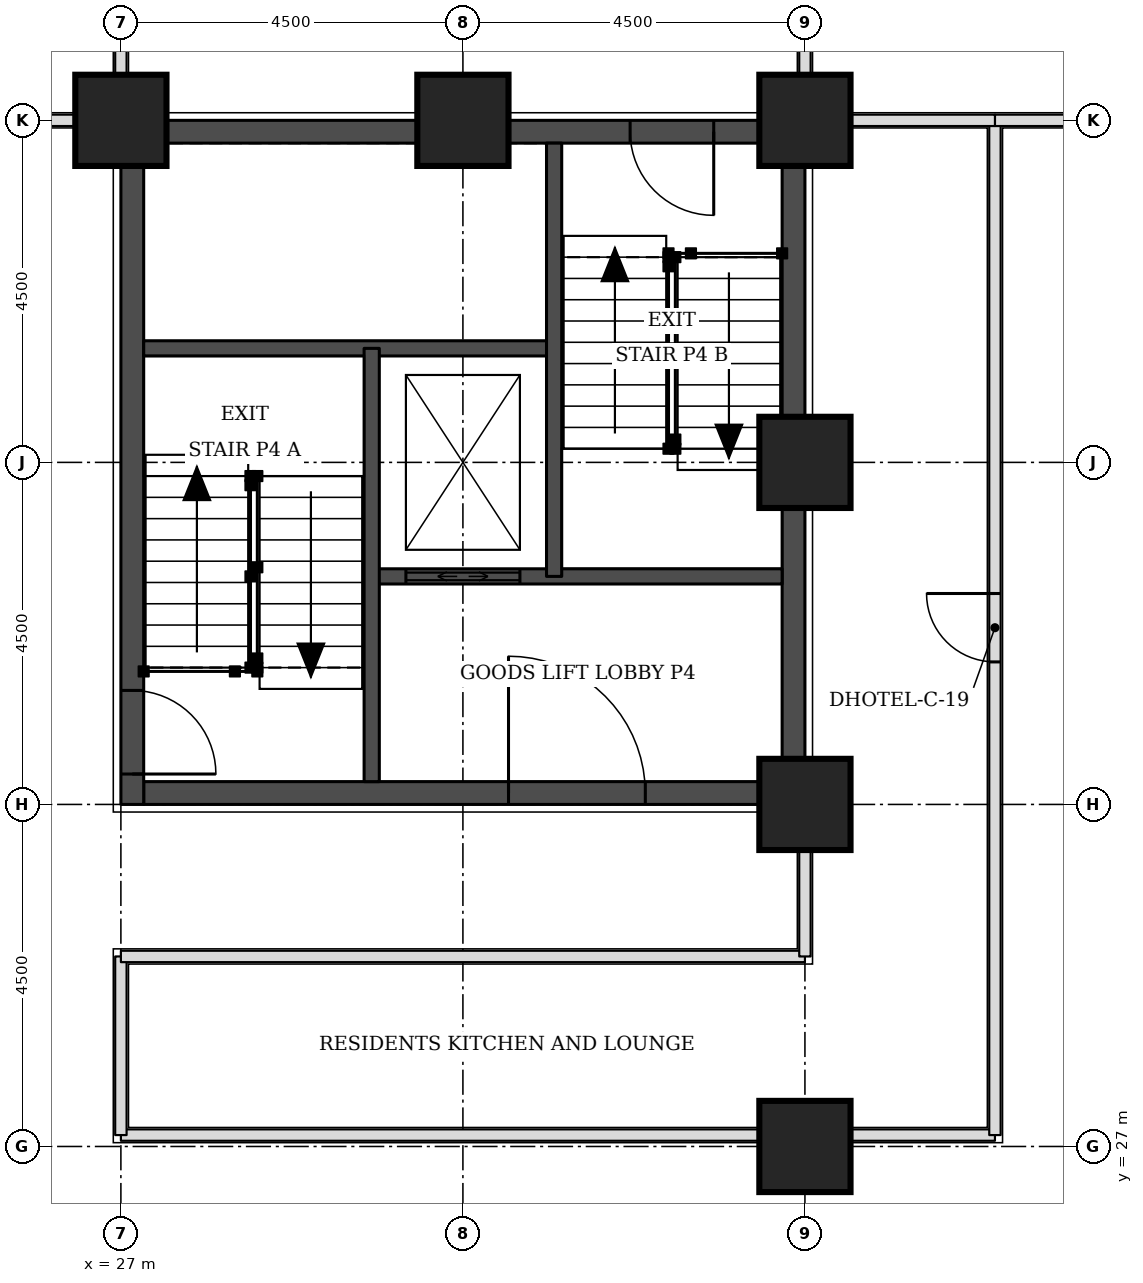
"""IFC4 building model, lengths in metres.
Left out: names, types, materials, properties, quantities, classifications, styles, units other than length and angle.
Written with IfcOpenShell. Run it as: python <this file> out.ifc"""

import sys

from ifc_helpers import new_model, si_unit, direction, frame, frame_2d, origin, origin_2d, place, context, subcontext, project, spatial, rectangle, extrude, element, fill, save


model = new_model("IFC4")
c1 = context("Model", 3, precision=1e-05, world=origin(), true_north=direction((0.0, 1.0)))
c2 = subcontext(c1, "Body", "Model", "MODEL_VIEW")
j1 = project(units=[si_unit("LENGTHUNIT", "METRE"), si_unit("PLANEANGLEUNIT", "RADIAN")], contexts=[c1])
p1 = place(None, origin())
s1 = spatial("IfcSite", under=j1, at=p1, CompositionType="ELEMENT")
p2 = place(p1, origin())
s2 = spatial("IfcBuilding", under=s1, at=p2, CompositionType="ELEMENT")
p3 = place(p2, frame((0.0, 0.0, 56.1)))
s3 = spatial("IfcBuildingStorey", under=s2, at=p3, CompositionType="ELEMENT", Elevation=56.1)
for number, where, z_axis, x_axis in (
    (1, (36.0, 27.0, 0.0), (0.0, 0.0, 1.0), (1.0, 0.0, 0.0)),
    (2, (36.0, 31.5, 0.0), (0.0, 0.0, 1.0), (1.0, 0.0, 0.0)),
    (3, (36.0, 36.0, 0.0), (0.0, 0.0, 1.0), (1.0, 0.0, 0.0)),
    (4, (27.0, 40.5, 0.0), (0.0, 0.0, 1.0), (1.0, 0.0, 0.0)),
    (5, (31.5, 40.5, 0.0), (0.0, 0.0, 1.0), (1.0, 0.0, 0.0)),
    (6, (36.0, 40.5, 0.0), (0.0, 0.0, 1.0), (1.0, 0.0, 0.0)),
):
    element("IfcColumn", number, at=place(p3, frame(where, z_axis=z_axis, x_axis=x_axis)), inside=s3, PredefinedType="COLUMN", context=c2, shape_type="SweptSolid", body=[
        extrude(rectangle(XDim=1.2, YDim=1.2, at=origin_2d()), origin(), (0.0, 0.0, 1.0), 3.3),
    ])
p4 = place(p3, frame((27.3, 31.65, 0.0), z_axis=(0.0, 0.0, 1.0), x_axis=(1.0, 0.0, 0.0)))
e7 = element("IfcWall", 7, at=p4, inside=s3, PredefinedType="SHEAR", context=c2, shape_type="SweptSolid", body=[
    extrude(rectangle(XDim=8.4, YDim=0.3, at=frame_2d((4.2, 0.0))), origin(), (0.0, 0.0, 1.0), 3.3),
])
p5 = place(p4, frame((4.8, 0.0, 0.0)))
e8 = element("IfcOpeningElement", 8, at=p5, cuts=e7, PredefinedType="OPENING", context=c2, shape_type="SweptSolid", body=[
    extrude(rectangle(XDim=1.8, YDim=2.1, at=frame_2d((0.9, 1.05))), frame((0.0, 0.16, 0.0), z_axis=(0.0, -1.0, 0.0), x_axis=(1.0, 0.0, 0.0)), (0.0, 0.0, 1.0), 0.32),
])
p6 = place(p3, frame((27.3, 40.35, 0.0), z_axis=(0.0, 0.0, 1.0), x_axis=(1.0, 0.0, 0.0)))
e9 = element("IfcWall", 9, at=p6, inside=s3, PredefinedType="SHEAR", context=c2, shape_type="SweptSolid", body=[
    extrude(rectangle(XDim=8.4, YDim=0.3, at=frame_2d((4.2, 0.0))), origin(), (0.0, 0.0, 1.0), 3.3),
])
p7 = place(p6, frame((6.4, 0.0, 0.0)))
e10 = element("IfcOpeningElement", 10, at=p7, cuts=e9, PredefinedType="OPENING", context=c2, shape_type="SweptSolid", body=[
    extrude(rectangle(XDim=1.1, YDim=2.1, at=frame_2d((0.55, 1.05))), frame((0.0, 0.16, 0.0), z_axis=(0.0, -1.0, 0.0), x_axis=(1.0, 0.0, 0.0)), (0.0, 0.0, 1.0), 0.32),
])
p8 = place(p3, frame((27.15, 31.5, 0.0), z_axis=(0.0, 0.0, 1.0), x_axis=(0.0, 1.0, 0.0)))
e11 = element("IfcWall", 11, at=p8, inside=s3, PredefinedType="SHEAR", context=c2, shape_type="SweptSolid", body=[
    extrude(rectangle(XDim=9.0, YDim=0.3, at=frame_2d((4.5, 0.0))), origin(), (0.0, 0.0, 1.0), 3.3),
])
p9 = place(p8, frame((0.4, 0.0, 0.0)))
e12 = element("IfcOpeningElement", 12, at=p9, cuts=e11, PredefinedType="OPENING", context=c2, shape_type="SweptSolid", body=[
    extrude(rectangle(XDim=1.1, YDim=2.1, at=frame_2d((0.55, 1.05))), frame((0.0, 0.16, 0.0), z_axis=(0.0, -1.0, 0.0), x_axis=(1.0, 0.0, 0.0)), (0.0, 0.0, 1.0), 0.32),
])
p10 = place(p3, frame((35.85, 31.5, 0.0), z_axis=(0.0, 0.0, 1.0), x_axis=(0.0, 1.0, 0.0)))
e13 = element("IfcWall", 13, at=p10, inside=s3, PredefinedType="SHEAR", context=c2, shape_type="SweptSolid", body=[
    extrude(rectangle(XDim=9.0, YDim=0.3, at=frame_2d((4.5, 0.0))), origin(), (0.0, 0.0, 1.0), 3.3),
])
p11 = place(p3, frame((27.0, 27.15, 0.0), z_axis=(0.0, 0.0, 1.0), x_axis=(1.0, 0.0, 0.0)))
e14 = element("IfcWall", 14, at=p11, inside=s3, PredefinedType="PARTITIONING", context=c2, shape_type="SweptSolid", body=[
    extrude(rectangle(XDim=11.5, YDim=0.15, at=frame_2d((5.75, 0.0))), origin(), (0.0, 0.0, 1.0), 3.08),
])
p12 = place(p3, frame((27.0, 27.15, 0.0), z_axis=(0.0, 0.0, 1.0), x_axis=(0.0, 1.0, 0.0)))
e15 = element("IfcWall", 15, at=p12, inside=s3, PredefinedType="PARTITIONING", context=c2, shape_type="SweptSolid", body=[
    extrude(rectangle(XDim=2.35, YDim=0.15, at=frame_2d((1.175, 0.0))), origin(), (0.0, 0.0, 1.0), 3.08),
])
p13 = place(p3, frame((38.5, 27.15, 0.0), z_axis=(0.0, 0.0, 1.0), x_axis=(0.0, 1.0, 0.0)))
e16 = element("IfcWall", 16, at=p13, inside=s3, PredefinedType="PARTITIONING", context=c2, shape_type="SweptSolid", body=[
    extrude(rectangle(XDim=13.35, YDim=0.15, at=frame_2d((6.675, 0.0))), origin(), (0.0, 0.0, 1.0), 3.08),
])
p14 = place(p13, frame((6.225, 0.0, 0.0)))
e17 = element("IfcOpeningElement", 17, at=p14, cuts=e16, PredefinedType="OPENING", context=c2, shape_type="SweptSolid", body=[
    extrude(rectangle(XDim=0.9, YDim=2.1, at=frame_2d((0.45, 1.05))), frame((0.0, 0.085, 0.0), z_axis=(0.0, -1.0, 0.0), x_axis=(1.0, 0.0, 0.0)), (0.0, 0.0, 1.0), 0.17),
])
p15 = place(p3, frame((27.0, 29.5, 0.0), z_axis=(0.0, 0.0, 1.0), x_axis=(1.0, 0.0, 0.0)))
e18 = element("IfcWall", 18, at=p15, inside=s3, PredefinedType="PARTITIONING", context=c2, shape_type="SweptSolid", body=[
    extrude(rectangle(XDim=9.0, YDim=0.15, at=frame_2d((4.5, 0.0))), origin(), (0.0, 0.0, 1.0), 3.08),
])
p16 = place(p3, frame((36.0, 29.5, 0.0), z_axis=(0.0, 0.0, 1.0), x_axis=(0.0, 1.0, 0.0)))
e19 = element("IfcWall", 19, at=p16, inside=s3, PredefinedType="PARTITIONING", context=c2, shape_type="SweptSolid", body=[
    extrude(rectangle(XDim=1.95, YDim=0.15, at=frame_2d((0.975, 0.0))), origin(), (0.0, 0.0, 1.0), 2.33),
])
p17 = place(p3, frame((24.6, 40.5, 0.0), z_axis=(0.0, 0.0, 1.0), x_axis=(1.0, 0.0, 0.0)))
e20 = element("IfcWall", 20, at=p17, inside=s3, PredefinedType="PARTITIONING", context=c2, shape_type="SweptSolid", body=[
    extrude(rectangle(XDim=2.35, YDim=0.15, at=frame_2d((1.175, 0.0))), origin(), (0.0, 0.0, 1.0), 2.33),
])
p18 = place(p3, frame((38.5, 40.5, 0.0), z_axis=(0.0, 0.0, 1.0), x_axis=(1.0, 0.0, 0.0)))
e21 = element("IfcWall", 21, at=p18, inside=s3, PredefinedType="PARTITIONING", context=c2, shape_type="SweptSolid", body=[
    extrude(rectangle(XDim=1.95, YDim=0.15, at=frame_2d((0.975, 0.0))), origin(), (0.0, 0.0, 1.0), 2.33),
])
p19 = place(p3, frame((27.0, 40.55, 0.0), z_axis=(0.0, 0.0, 1.0), x_axis=(0.0, 1.0, 0.0)))
e22 = element("IfcWall", 22, at=p19, inside=s3, PredefinedType="PARTITIONING", context=c2, shape_type="SweptSolid", body=[
    extrude(rectangle(XDim=2.45, YDim=0.15, at=frame_2d((1.225, 0.0))), origin(), (0.0, 0.0, 1.0), 3.08),
])
p20 = place(p3, frame((36.0, 40.55, 0.0), z_axis=(0.0, 0.0, 1.0), x_axis=(0.0, 1.0, 0.0)))
e23 = element("IfcWall", 23, at=p20, inside=s3, PredefinedType="PARTITIONING", context=c2, shape_type="SweptSolid", body=[
    extrude(rectangle(XDim=4.4, YDim=0.15, at=frame_2d((2.2, 0.0))), origin(), (0.0, 0.0, 1.0), 2.33),
])
p21 = place(p3, frame((36.05, 40.5, 0.0), z_axis=(0.0, 0.0, 1.0), x_axis=(1.0, 0.0, 0.0)))
e24 = element("IfcWall", 24, at=p21, inside=s3, PredefinedType="PARTITIONING", context=c2, shape_type="SweptSolid", body=[
    extrude(rectangle(XDim=2.45, YDim=0.15, at=frame_2d((1.225, 0.0))), origin(), (0.0, 0.0, 1.0), 2.33),
])
p22 = place(p3, frame((30.3, 34.5, 0.0), z_axis=(0.0, 0.0, 1.0), x_axis=(1.0, 0.0, 0.0)))
e25 = element("IfcWall", 25, at=p22, inside=s3, PredefinedType="SOLIDWALL", context=c2, shape_type="SweptSolid", body=[
    extrude(rectangle(XDim=5.4, YDim=0.2, at=frame_2d((2.7, 0.0))), origin(), (0.0, 0.0, 1.0), 3.08),
])
p23 = place(p22, frame((0.45, 0.0, 0.0)))
e26 = element("IfcOpeningElement", 26, at=p23, cuts=e25, PredefinedType="OPENING", context=c2, shape_type="SweptSolid", body=[
    extrude(rectangle(XDim=1.5, YDim=2.1, at=frame_2d((0.75, 1.05))), frame((0.0, 0.11, 0.0), z_axis=(0.0, -1.0, 0.0), x_axis=(1.0, 0.0, 0.0)), (0.0, 0.0, 1.0), 0.22),
])
p24 = place(p3, frame((27.3, 37.5, 0.0), z_axis=(0.0, 0.0, 1.0), x_axis=(1.0, 0.0, 0.0)))
e27 = element("IfcWall", 27, at=p24, inside=s3, PredefinedType="SOLIDWALL", context=c2, shape_type="SweptSolid", body=[
    extrude(rectangle(XDim=5.4, YDim=0.2, at=frame_2d((2.7, 0.0))), origin(), (0.0, 0.0, 1.0), 3.08),
])
for number, where, z_axis, x_axis in (
    (28, (30.3, 31.8, 0.0), (0.0, 0.0, 1.0), (0.0, 1.0, 0.0)),
    (29, (32.7, 34.5, 0.0), (0.0, 0.0, 1.0), (0.0, 1.0, 0.0)),
):
    element("IfcWall", number, at=place(p3, frame(where, z_axis=z_axis, x_axis=x_axis)), inside=s3, PredefinedType="SOLIDWALL", context=c2, shape_type="SweptSolid", body=[
        extrude(rectangle(XDim=5.7, YDim=0.2, at=frame_2d((2.85, 0.0))), origin(), (0.0, 0.0, 1.0), 3.08),
    ])
p25 = place(p14, origin())
e30 = element("IfcDoor", 30, at=p25, inside=s3, OperationType="SINGLE_SWING_RIGHT", PredefinedType="DOOR", context=c2, shape_type="SweptSolid", body=[
    extrude(rectangle(XDim=0.9, YDim=2.1, at=frame_2d((0.45, 1.05))), frame((0.0, 0.025, 0.0), z_axis=(0.0, -1.0, 0.0), x_axis=(1.0, 0.0, 0.0)), (0.0, 0.0, 1.0), 0.05),
])
fill(e17, e30)
p26 = place(p9, frame((1.1, 0.0, 0.0), z_axis=(0.0, 0.0, 1.0), x_axis=(-1.0, 0.0, 0.0)))
e31 = element("IfcDoor", 31, at=p26, inside=s3, OperationType="SINGLE_SWING_RIGHT", PredefinedType="DOOR", context=c2, shape_type="SweptSolid", body=[
    extrude(rectangle(XDim=1.1, YDim=2.1, at=frame_2d((0.55, 1.05))), frame((0.0, 0.025, 0.0), z_axis=(0.0, -1.0, 0.0), x_axis=(1.0, 0.0, 0.0)), (0.0, 0.0, 1.0), 0.05),
])
fill(e12, e31)
p27 = place(p7, frame((1.1, 0.0, 0.0), z_axis=(0.0, 0.0, 1.0), x_axis=(-1.0, 0.0, 0.0)))
e32 = element("IfcDoor", 32, at=p27, inside=s3, OperationType="SINGLE_SWING_LEFT", PredefinedType="DOOR", context=c2, shape_type="SweptSolid", body=[
    extrude(rectangle(XDim=1.1, YDim=2.1, at=frame_2d((0.55, 1.05))), frame((0.0, 0.025, 0.0), z_axis=(0.0, -1.0, 0.0), x_axis=(1.0, 0.0, 0.0)), (0.0, 0.0, 1.0), 0.05),
])
fill(e10, e32)
p28 = place(p23, origin())
e33 = element("IfcDoor", 33, at=p28, inside=s3, OperationType="DOUBLE_DOOR_SLIDING", PredefinedType="DOOR", context=c2, shape_type="SweptSolid", body=[
    extrude(rectangle(XDim=1.5, YDim=2.1, at=frame_2d((0.75, 1.05))), frame((0.0, 0.025, 0.0), z_axis=(0.0, -1.0, 0.0), x_axis=(1.0, 0.0, 0.0)), (0.0, 0.0, 1.0), 0.05),
])
fill(e26, e33)
p29 = place(p5, origin())
e34 = element("IfcDoor", 34, at=p29, inside=s3, OperationType="SINGLE_SWING_LEFT", PredefinedType="DOOR", context=c2, shape_type="SweptSolid", body=[
    extrude(rectangle(XDim=1.8, YDim=2.1, at=frame_2d((0.9, 1.05))), frame((0.0, 0.025, 0.0), z_axis=(0.0, -1.0, 0.0), x_axis=(1.0, 0.0, 0.0)), (0.0, 0.0, 1.0), 0.05),
])
fill(e8, e34)
save(model, sys.argv[1])
